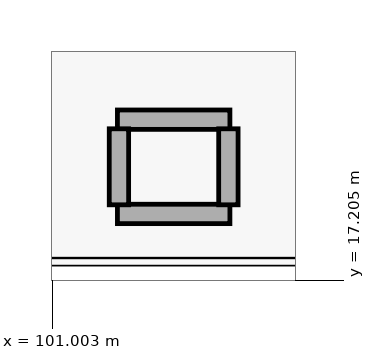
"""IFC4 building model, lengths in metres.
Left out: names, types, materials, properties, quantities, classifications, styles, units other than length and angle.
Written with IfcOpenShell. Run it as: python <this file> out.ifc"""

import sys

from ifc_helpers import new_model, si_unit, direction, frame, frame_2d, origin, place, context, subcontext, project, spatial, rectangle, extrude, element, save


model = new_model("IFC4")
c1 = context("Model", 3, precision=1e-05, world=origin(), true_north=direction((0.0, 1.0)))
c2 = subcontext(c1, "Body", "Model", "MODEL_VIEW")
j1 = project(units=[si_unit("LENGTHUNIT", "METRE"), si_unit("PLANEANGLEUNIT", "RADIAN")], contexts=[c1])
p1 = place(None, origin())
s1 = spatial("IfcSite", under=j1, at=p1, CompositionType="ELEMENT")
p2 = place(p1, origin())
s2 = spatial("IfcBuilding", under=s1, at=p2, CompositionType="ELEMENT")
p3 = place(p2, frame((0.0, 0.0, 5.4)))
s3 = spatial("IfcBuildingStorey", under=s2, at=p3, CompositionType="ELEMENT", Elevation=5.4)
for number, where, z_axis, x_axis in (
    (1, (101.86, 19.32, 0.0), (0.0, 0.0, 1.0), (1.0, 0.0, 0.0)),
    (2, (101.86, 18.08, 0.0), (0.0, 0.0, 1.0), (1.0, 0.0, 0.0)),
):
    element("IfcWall", number, at=place(p3, frame(where, z_axis=z_axis, x_axis=x_axis)), inside=s3, PredefinedType="PARTITIONING", context=c2, shape_type="SweptSolid", body=[
        extrude(rectangle(XDim=1.48, YDim=0.255, at=frame_2d((0.74, 0.0))), origin(), (0.0, 0.0, 1.0), 4.72),
    ])
for number, where, z_axis, x_axis in (
    (3, (101.88, 18.2, 0.0), (0.0, 0.0, 1.0), (0.0, 1.0, 0.0)),
    (4, (103.32, 18.2, 0.0), (0.0, 0.0, 1.0), (0.0, 1.0, 0.0)),
):
    element("IfcWall", number, at=place(p3, frame(where, z_axis=z_axis, x_axis=x_axis)), inside=s3, PredefinedType="PARTITIONING", context=c2, shape_type="SweptSolid", body=[
        extrude(rectangle(XDim=1.0, YDim=0.255, at=frame_2d((0.5, 0.0))), origin(), (0.0, 0.0, 1.0), 4.72),
    ])
save(model, sys.argv[1])
